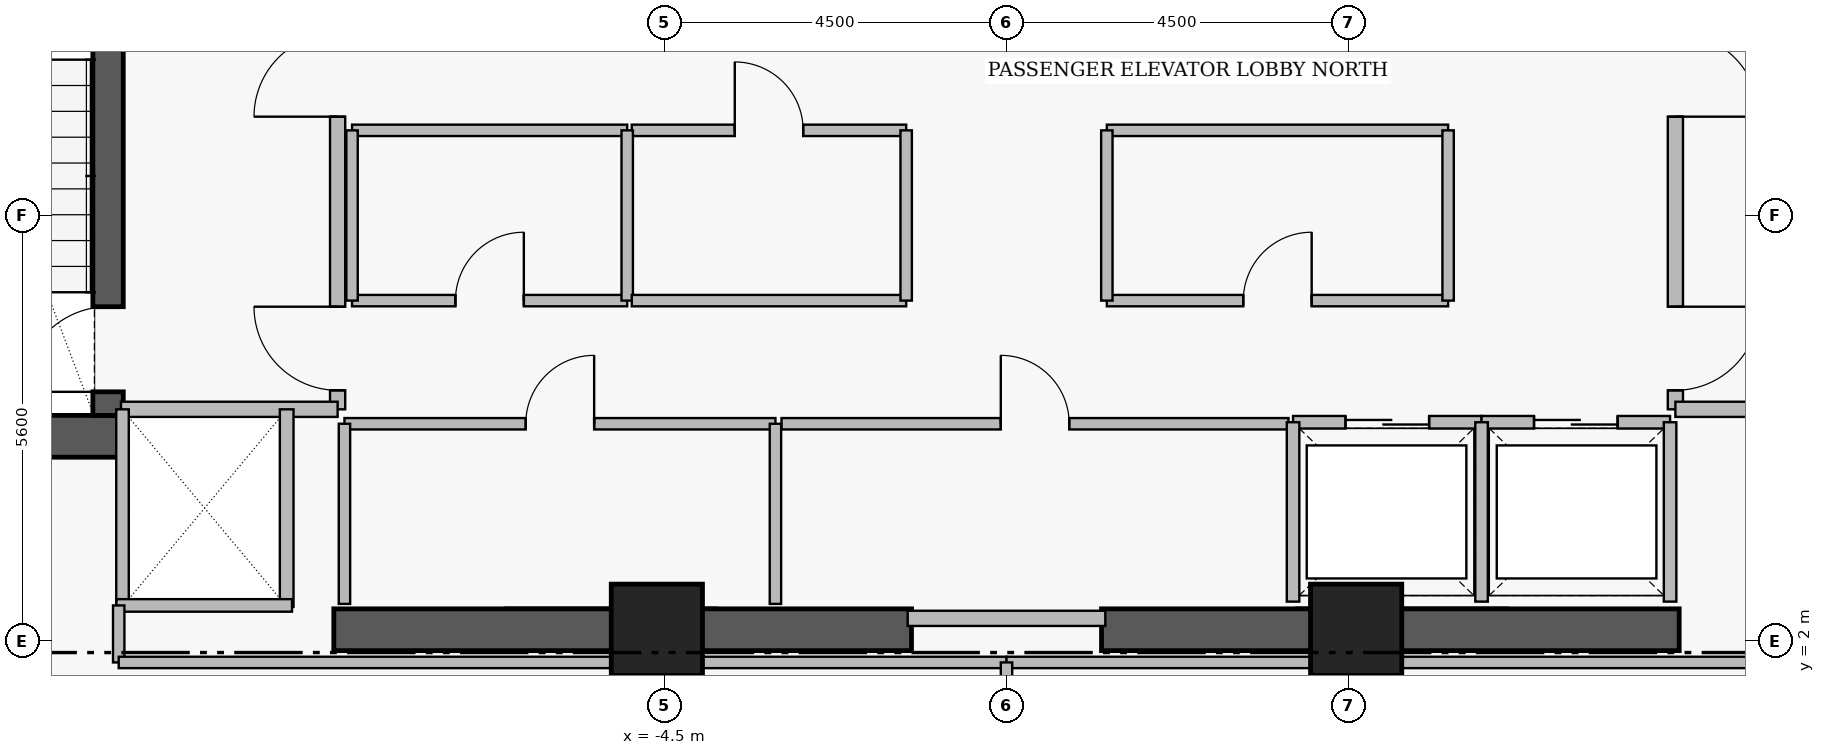
"""IFC4 building model, lengths in metres.
Left out: names, types, materials, properties, quantities, classifications, styles, units other than length and angle.
Written with IfcOpenShell. Run it as: python <this file> out.ifc"""

import sys

from ifc_helpers import new_model, si_unit, direction, frame, frame_2d, origin, origin_2d, place, context, subcontext, project, spatial, rectangle, extrude, element, fill, save


model = new_model("IFC4")
c1 = context("Model", 3, precision=1e-05, world=origin(), true_north=direction((0.0, 1.0)))
c2 = subcontext(c1, "Body", "Model", "MODEL_VIEW")
j1 = project(units=[si_unit("LENGTHUNIT", "METRE"), si_unit("PLANEANGLEUNIT", "RADIAN")], contexts=[c1])
p1 = place(None, origin())
s1 = spatial("IfcSite", under=j1, at=p1, CompositionType="ELEMENT")
p2 = place(p1, origin())
s2 = spatial("IfcBuilding", under=s1, at=p2, CompositionType="ELEMENT")
p3 = place(p2, frame((0.0, 0.0, 280.35)))
s3 = spatial("IfcBuildingStorey", under=s2, at=p3, CompositionType="ELEMENT", Elevation=280.35)
p4 = place(p3, frame((-15.96, 4.695, 0.0), z_axis=(0.0, 0.0, 1.0), x_axis=(1.0, 0.0, 0.0)))
e1 = element("IfcWall", 1, at=p4, inside=s3, PredefinedType="SHEAR", context=c2, shape_type="SweptSolid", body=[
    extrude(rectangle(XDim=4.36, YDim=0.55, at=frame_2d((2.18, 0.0))), origin(), (0.0, 0.0, 1.0), 3.51),
])
for number, where, z_axis, x_axis in (
    (2, (-8.85, 2.15, 0.0), (0.0, 0.0, 1.0), (1.0, 0.0, 0.0)),
    (3, (1.25, 2.15, 0.0), (0.0, 0.0, 1.0), (1.0, 0.0, 0.0)),
):
    element("IfcWall", number, at=place(p3, frame(where, z_axis=z_axis, x_axis=x_axis)), inside=s3, PredefinedType="SHEAR", context=c2, shape_type="SweptSolid", body=[
        extrude(rectangle(XDim=7.6, YDim=0.55, at=frame_2d((3.8, 0.0))), origin(), (0.0, 0.0, 1.0), 3.48),
    ])
p5 = place(p3, frame((-11.82, 4.97, 0.0), z_axis=(0.0, 0.0, 1.0), x_axis=(0.0, 1.0, 0.0)))
e4 = element("IfcWall", 4, at=p5, inside=s3, PredefinedType="SHEAR", context=c2, shape_type="SweptSolid", body=[
    extrude(rectangle(XDim=8.96, YDim=0.4, at=frame_2d((4.48, 0.0))), origin(), (0.0, 0.0, 1.0), 3.51),
])
p6 = place(p5, frame((0.31, 0.0, 0.0)))
e5 = element("IfcOpeningElement", 5, at=p6, cuts=e4, PredefinedType="OPENING", context=c2, shape_type="SweptSolid", body=[
    extrude(rectangle(XDim=1.12, YDim=2.22, at=frame_2d((0.56, 1.11))), frame((0.0, 0.21, 0.0), z_axis=(0.0, -1.0, 0.0), x_axis=(1.0, 0.0, 0.0)), (0.0, 0.0, 1.0), 0.42),
])
for number, where, z_axis, x_axis in (
    (6, (-4.6, 2.15, 0.0), (0.0, 0.0, 1.0), (1.0, 0.0, 0.0)),
    (7, (4.6, 2.15, 0.0), (0.0, 0.0, 1.0), (1.0, 0.0, 0.0)),
):
    element("IfcColumn", number, at=place(p3, frame(where, z_axis=z_axis, x_axis=x_axis)), inside=s3, PredefinedType="COLUMN", context=c2, shape_type="SweptSolid", body=[
        extrude(rectangle(XDim=1.2, YDim=1.2, at=origin_2d()), origin(), (0.0, 0.0, 1.0), 3.7),
    ])
p7 = place(p3, frame((-8.8, 5.05, 0.0), z_axis=(0.0, 0.0, 1.0), x_axis=(0.0, 1.0, 0.0)))
e8 = element("IfcWall", 8, at=p7, inside=s3, PredefinedType="PARTITIONING", context=c2, shape_type="SweptSolid", body=[
    extrude(rectangle(XDim=6.1, YDim=0.2, at=frame_2d((3.05, 0.0))), origin(), (0.0, 0.0, 1.0), 3.48),
])
p8 = place(p7, frame((0.25, 0.0, 0.0)))
e9 = element("IfcOpeningElement", 9, at=p8, cuts=e8, PredefinedType="OPENING", context=c2, shape_type="SweptSolid", body=[
    extrude(rectangle(XDim=1.1, YDim=2.2, at=frame_2d((0.55, 1.1))), frame((0.0, 0.11, 0.0), z_axis=(0.0, -1.0, 0.0), x_axis=(1.0, 0.0, 0.0)), (0.0, 0.0, 1.0), 0.22),
])
p9 = place(p7, frame((3.85, 0.0, 0.0)))
e10 = element("IfcOpeningElement", 10, at=p9, cuts=e8, PredefinedType="OPENING", context=c2, shape_type="SweptSolid", body=[
    extrude(rectangle(XDim=1.1, YDim=2.2, at=frame_2d((0.55, 1.1))), frame((0.0, 0.11, 0.0), z_axis=(0.0, -1.0, 0.0), x_axis=(1.0, 0.0, 0.0)), (0.0, 0.0, 1.0), 0.22),
])
p10 = place(p3, frame((8.8, 11.15, 0.0), z_axis=(0.0, 0.0, 1.0), x_axis=(0.0, -1.0, 0.0)))
e11 = element("IfcWall", 11, at=p10, inside=s3, PredefinedType="PARTITIONING", context=c2, shape_type="SweptSolid", body=[
    extrude(rectangle(XDim=6.1, YDim=0.2, at=frame_2d((3.05, 0.0))), origin(), (0.0, 0.0, 1.0), 3.48),
])
p11 = place(p10, frame((1.15, 0.0, 0.0)))
e12 = element("IfcOpeningElement", 12, at=p11, cuts=e11, PredefinedType="OPENING", context=c2, shape_type="SweptSolid", body=[
    extrude(rectangle(XDim=1.1, YDim=2.2, at=frame_2d((0.55, 1.1))), frame((0.0, 0.11, 0.0), z_axis=(0.0, -1.0, 0.0), x_axis=(1.0, 0.0, 0.0)), (0.0, 0.0, 1.0), 0.22),
])
p12 = place(p10, frame((4.75, 0.0, 0.0)))
e13 = element("IfcOpeningElement", 13, at=p12, cuts=e11, PredefinedType="OPENING", context=c2, shape_type="SweptSolid", body=[
    extrude(rectangle(XDim=1.1, YDim=2.2, at=frame_2d((0.55, 1.1))), frame((0.0, 0.11, 0.0), z_axis=(0.0, -1.0, 0.0), x_axis=(1.0, 0.0, 0.0)), (0.0, 0.0, 1.0), 0.22),
])
p13 = place(p3, frame((3.77, 4.88, 0.0), z_axis=(0.0, 0.0, 1.0), x_axis=(1.0, 0.0, 0.0)))
e14 = element("IfcWall", 14, at=p13, inside=s3, PredefinedType="PARTITIONING", context=c2, shape_type="SweptSolid", body=[
    extrude(rectangle(XDim=2.48, YDim=0.165, at=frame_2d((1.24, 0.0))), origin(), (0.0, 0.0, 1.0), 3.48),
])
p14 = place(p13, frame((0.69, 0.0, 0.0)))
e15 = element("IfcOpeningElement", 15, at=p14, cuts=e14, PredefinedType="OPENING", context=c2, shape_type="SweptSolid", body=[
    extrude(rectangle(XDim=1.1, YDim=2.25, at=frame_2d((0.55, 1.125))), frame((0.0, 0.093, 0.0), z_axis=(0.0, -1.0, 0.0), x_axis=(1.0, 0.0, 0.0)), (0.0, 0.0, 1.0), 0.185),
])
p15 = place(p3, frame((6.25, 4.88, 0.0), z_axis=(0.0, 0.0, 1.0), x_axis=(1.0, 0.0, 0.0)))
e16 = element("IfcWall", 16, at=p15, inside=s3, PredefinedType="PARTITIONING", context=c2, shape_type="SweptSolid", body=[
    extrude(rectangle(XDim=2.48, YDim=0.165, at=frame_2d((1.24, 0.0))), origin(), (0.0, 0.0, 1.0), 3.48),
])
p16 = place(p15, frame((0.69, 0.0, 0.0)))
e17 = element("IfcOpeningElement", 17, at=p16, cuts=e16, PredefinedType="OPENING", context=c2, shape_type="SweptSolid", body=[
    extrude(rectangle(XDim=1.1, YDim=2.25, at=frame_2d((0.55, 1.125))), frame((0.0, 0.093, 0.0), z_axis=(0.0, -1.0, 0.0), x_axis=(1.0, 0.0, 0.0)), (0.0, 0.0, 1.0), 0.185),
])
p17 = place(p3, frame((-8.71, 4.86, 0.0), z_axis=(0.0, 0.0, 1.0), x_axis=(1.0, 0.0, 0.0)))
e18 = element("IfcWall", 18, at=p17, inside=s3, PredefinedType="PARTITIONING", context=c2, shape_type="SweptSolid", body=[
    extrude(rectangle(XDim=5.67, YDim=0.15, at=frame_2d((2.835, 0.0))), origin(), (0.0, 0.0, 1.0), 3.48),
])
p18 = place(p17, frame((2.385, 0.0, 0.0)))
e19 = element("IfcOpeningElement", 19, at=p18, cuts=e18, PredefinedType="OPENING", context=c2, shape_type="SweptSolid", body=[
    extrude(rectangle(XDim=0.9, YDim=2.15, at=frame_2d((0.45, 1.075))), frame((0.0, 0.085, 0.0), z_axis=(0.0, -1.0, 0.0), x_axis=(1.0, 0.0, 0.0)), (0.0, 0.0, 1.0), 0.17),
])
p19 = place(p3, frame((-2.96, 4.86, 0.0), z_axis=(0.0, 0.0, 1.0), x_axis=(1.0, 0.0, 0.0)))
e20 = element("IfcWall", 20, at=p19, inside=s3, PredefinedType="PARTITIONING", context=c2, shape_type="SweptSolid", body=[
    extrude(rectangle(XDim=6.67, YDim=0.15, at=frame_2d((3.335, 0.0))), origin(), (0.0, 0.0, 1.0), 3.48),
])
p20 = place(p19, frame((2.885, 0.0, 0.0)))
e21 = element("IfcOpeningElement", 21, at=p20, cuts=e20, PredefinedType="OPENING", context=c2, shape_type="SweptSolid", body=[
    extrude(rectangle(XDim=0.9, YDim=2.15, at=frame_2d((0.45, 1.075))), frame((0.0, 0.085, 0.0), z_axis=(0.0, -1.0, 0.0), x_axis=(1.0, 0.0, 0.0)), (0.0, 0.0, 1.0), 0.17),
])
p21 = place(p3, frame((-8.61, 6.48, 0.0), z_axis=(0.0, 0.0, 1.0), x_axis=(1.0, 0.0, 0.0)))
e22 = element("IfcWall", 22, at=p21, inside=s3, PredefinedType="PARTITIONING", context=c2, shape_type="SweptSolid", body=[
    extrude(rectangle(XDim=3.62, YDim=0.15, at=frame_2d((1.81, 0.0))), origin(), (0.0, 0.0, 1.0), 3.48),
])
p22 = place(p21, frame((1.36, 0.0, 0.0)))
e23 = element("IfcOpeningElement", 23, at=p22, cuts=e22, PredefinedType="OPENING", context=c2, shape_type="SweptSolid", body=[
    extrude(rectangle(XDim=0.9, YDim=2.15, at=frame_2d((0.45, 1.075))), frame((0.0, 0.085, 0.0), z_axis=(0.0, -1.0, 0.0), x_axis=(1.0, 0.0, 0.0)), (0.0, 0.0, 1.0), 0.17),
])
p23 = place(p3, frame((-4.93, 8.72, 0.0), z_axis=(0.0, 0.0, 1.0), x_axis=(1.0, 0.0, 0.0)))
e24 = element("IfcWall", 24, at=p23, inside=s3, PredefinedType="PARTITIONING", context=c2, shape_type="SweptSolid", body=[
    extrude(rectangle(XDim=3.61, YDim=0.15, at=frame_2d((1.805, 0.0))), origin(), (0.0, 0.0, 1.0), 3.48),
])
p24 = place(p23, frame((1.355, 0.0, 0.0)))
e25 = element("IfcOpeningElement", 25, at=p24, cuts=e24, PredefinedType="OPENING", context=c2, shape_type="SweptSolid", body=[
    extrude(rectangle(XDim=0.9, YDim=2.15, at=frame_2d((0.45, 1.075))), frame((0.0, 0.085, 0.0), z_axis=(0.0, -1.0, 0.0), x_axis=(1.0, 0.0, 0.0)), (0.0, 0.0, 1.0), 0.17),
])
p25 = place(p3, frame((1.32, 6.48, 0.0), z_axis=(0.0, 0.0, 1.0), x_axis=(1.0, 0.0, 0.0)))
e26 = element("IfcWall", 26, at=p25, inside=s3, PredefinedType="PARTITIONING", context=c2, shape_type="SweptSolid", body=[
    extrude(rectangle(XDim=4.49, YDim=0.15, at=frame_2d((2.245, 0.0))), origin(), (0.0, 0.0, 1.0), 3.48),
])
p26 = place(p25, frame((1.795, 0.0, 0.0)))
e27 = element("IfcOpeningElement", 27, at=p26, cuts=e26, PredefinedType="OPENING", context=c2, shape_type="SweptSolid", body=[
    extrude(rectangle(XDim=0.9, YDim=2.15, at=frame_2d((0.45, 1.075))), frame((0.0, 0.085, 0.0), z_axis=(0.0, -1.0, 0.0), x_axis=(1.0, 0.0, 0.0)), (0.0, 0.0, 1.0), 0.17),
])
for number, where, z_axis, x_axis in (
    (28, (-11.65, 5.05, 0.0), (0.0, 0.0, 1.0), (1.0, 0.0, 0.0)),
    (29, (8.8, 5.05, 0.0), (0.0, 0.0, 1.0), (1.0, 0.0, 0.0)),
):
    element("IfcWall", number, at=place(p3, frame(where, z_axis=z_axis, x_axis=x_axis)), inside=s3, PredefinedType="PARTITIONING", context=c2, shape_type="SweptSolid", body=[
        extrude(rectangle(XDim=2.85, YDim=0.2, at=frame_2d((1.425, 0.0))), origin(), (0.0, 0.0, 1.0), 3.48),
    ])
for number, where, z_axis, x_axis in (
    (30, (3.77, 2.52, 0.0), (0.0, 0.0, 1.0), (0.0, 1.0, 0.0)),
    (31, (6.25, 2.52, 0.0), (0.0, 0.0, 1.0), (0.0, 1.0, 0.0)),
    (32, (8.73, 2.52, 0.0), (0.0, 0.0, 1.0), (0.0, 1.0, 0.0)),
):
    element("IfcWall", number, at=place(p3, frame(where, z_axis=z_axis, x_axis=x_axis)), inside=s3, PredefinedType="PARTITIONING", context=c2, shape_type="SweptSolid", body=[
        extrude(rectangle(XDim=2.36, YDim=0.165, at=frame_2d((1.18, 0.0))), origin(), (0.0, 0.0, 1.0), 3.48),
    ])
p27 = place(p3, frame((-1.3, 2.3, 0.0), z_axis=(0.0, 0.0, 1.0), x_axis=(1.0, 0.0, 0.0)))
e33 = element("IfcWall", 33, at=p27, inside=s3, PredefinedType="PARTITIONING", context=c2, shape_type="SweptSolid", body=[
    extrude(rectangle(XDim=2.6, YDim=0.2, at=frame_2d((1.3, 0.0))), origin(), (0.0, 0.0, 1.0), 2.38),
])
for number, where, z_axis, x_axis in (
    (34, (-8.71, 2.49, 0.0), (0.0, 0.0, 1.0), (0.0, 1.0, 0.0)),
    (35, (-3.04, 2.49, 0.0), (0.0, 0.0, 1.0), (0.0, 1.0, 0.0)),
):
    element("IfcWall", number, at=place(p3, frame(where, z_axis=z_axis, x_axis=x_axis)), inside=s3, PredefinedType="PARTITIONING", context=c2, shape_type="SweptSolid", body=[
        extrude(rectangle(XDim=2.37, YDim=0.15, at=frame_2d((1.185, 0.0))), origin(), (0.0, 0.0, 1.0), 3.48),
    ])
p28 = place(p3, frame((-9.47, 2.45, 0.0), z_axis=(0.0, 0.0, 1.0), x_axis=(0.0, 1.0, 0.0)))
e36 = element("IfcWall", 36, at=p28, inside=s3, PredefinedType="PARTITIONING", context=c2, shape_type="SweptSolid", body=[
    extrude(rectangle(XDim=2.6, YDim=0.18, at=frame_2d((1.3, 0.0))), origin(), (0.0, 0.0, 1.0), 3.48),
])
p29 = place(p3, frame((-11.63, 2.47, 0.0), z_axis=(0.0, 0.0, 1.0), x_axis=(0.0, 1.0, 0.0)))
e37 = element("IfcWall", 37, at=p29, inside=s3, PredefinedType="PARTITIONING", context=c2, shape_type="SweptSolid", body=[
    extrude(rectangle(XDim=2.58, YDim=0.165, at=frame_2d((1.29, 0.0))), origin(), (0.0, 0.0, 1.0), 3.48),
])
p30 = place(p3, frame((-11.71, 2.47, 0.0), z_axis=(0.0, 0.0, 1.0), x_axis=(1.0, 0.0, 0.0)))
e38 = element("IfcWall", 38, at=p30, inside=s3, PredefinedType="PARTITIONING", context=c2, shape_type="SweptSolid", body=[
    extrude(rectangle(XDim=2.31, YDim=0.165, at=frame_2d((1.155, 0.0))), origin(), (0.0, 0.0, 1.0), 2.38),
])
p31 = place(p3, frame((-8.61, 8.72, 0.0), z_axis=(0.0, 0.0, 1.0), x_axis=(1.0, 0.0, 0.0)))
e39 = element("IfcWall", 39, at=p31, inside=s3, PredefinedType="PARTITIONING", context=c2, shape_type="SweptSolid", body=[
    extrude(rectangle(XDim=3.62, YDim=0.15, at=frame_2d((1.81, 0.0))), origin(), (0.0, 0.0, 1.0), 3.48),
])
for number, where, z_axis, x_axis in (
    (40, (-8.61, 6.48, 0.0), (0.0, 0.0, 1.0), (0.0, 1.0, 0.0)),
    (41, (-4.99, 6.48, 0.0), (0.0, 0.0, 1.0), (0.0, 1.0, 0.0)),
):
    element("IfcWall", number, at=place(p3, frame(where, z_axis=z_axis, x_axis=x_axis)), inside=s3, PredefinedType="PARTITIONING", context=c2, shape_type="SweptSolid", body=[
        extrude(rectangle(XDim=2.24, YDim=0.15, at=frame_2d((1.12, 0.0))), origin(), (0.0, 0.0, 1.0), 3.48),
    ])
p32 = place(p3, frame((-4.93, 6.48, 0.0), z_axis=(0.0, 0.0, 1.0), x_axis=(1.0, 0.0, 0.0)))
e42 = element("IfcWall", 42, at=p32, inside=s3, PredefinedType="PARTITIONING", context=c2, shape_type="SweptSolid", body=[
    extrude(rectangle(XDim=3.61, YDim=0.15, at=frame_2d((1.805, 0.0))), origin(), (0.0, 0.0, 1.0), 3.48),
])
p33 = place(p3, frame((-1.32, 6.48, 0.0), z_axis=(0.0, 0.0, 1.0), x_axis=(0.0, 1.0, 0.0)))
e43 = element("IfcWall", 43, at=p33, inside=s3, PredefinedType="PARTITIONING", context=c2, shape_type="SweptSolid", body=[
    extrude(rectangle(XDim=2.24, YDim=0.15, at=frame_2d((1.12, 0.0))), origin(), (0.0, 0.0, 1.0), 3.48),
])
p34 = place(p3, frame((1.32, 8.72, 0.0), z_axis=(0.0, 0.0, 1.0), x_axis=(1.0, 0.0, 0.0)))
e44 = element("IfcWall", 44, at=p34, inside=s3, PredefinedType="PARTITIONING", context=c2, shape_type="SweptSolid", body=[
    extrude(rectangle(XDim=4.49, YDim=0.15, at=frame_2d((2.245, 0.0))), origin(), (0.0, 0.0, 1.0), 3.48),
])
for number, where, z_axis, x_axis in (
    (45, (1.32, 6.48, 0.0), (0.0, 0.0, 1.0), (0.0, 1.0, 0.0)),
    (46, (5.81, 6.48, 0.0), (0.0, 0.0, 1.0), (0.0, 1.0, 0.0)),
):
    element("IfcWall", number, at=place(p3, frame(where, z_axis=z_axis, x_axis=x_axis)), inside=s3, PredefinedType="PARTITIONING", context=c2, shape_type="SweptSolid", body=[
        extrude(rectangle(XDim=2.24, YDim=0.15, at=frame_2d((1.12, 0.0))), origin(), (0.0, 0.0, 1.0), 3.48),
    ])
p35 = place(p3, frame((-11.68, 1.72, 0.0), z_axis=(0.0, 0.0, 1.0), x_axis=(0.0, 1.0, 0.0)))
e47 = element("IfcWall", 47, at=p35, inside=s3, PredefinedType="PARTITIONING", context=c2, shape_type="SweptSolid", body=[
    extrude(rectangle(XDim=0.75, YDim=0.15, at=frame_2d((0.375, 0.0))), origin(), (0.0, 0.0, 1.0), 3.48),
])
for number, where, z_axis, x_axis in (
    (48, (-11.68, 1.72, 0.0), (0.0, 0.0, 1.0), (1.0, 0.0, 0.0)),
    (49, (0.0, 1.72, 0.0), (0.0, 0.0, 1.0), (1.0, 0.0, 0.0)),
):
    element("IfcWall", number, at=place(p3, frame(where, z_axis=z_axis, x_axis=x_axis)), inside=s3, PredefinedType="PARTITIONING", context=c2, shape_type="SweptSolid", body=[
        extrude(rectangle(XDim=11.68, YDim=0.15, at=frame_2d((5.84, 0.0))), origin(), (0.0, 0.0, 1.0), 2.38),
    ])
p36 = place(p3, frame((0.0, 0.06, 0.0), z_axis=(0.0, 0.0, 1.0), x_axis=(0.0, 1.0, 0.0)))
e50 = element("IfcWall", 50, at=p36, inside=s3, PredefinedType="PARTITIONING", context=c2, shape_type="SweptSolid", body=[
    extrude(rectangle(XDim=1.66, YDim=0.15, at=frame_2d((0.83, 0.0))), origin(), (0.0, 0.0, 1.0), 3.48),
])
p37 = place(p6, origin())
e51 = element("IfcDoor", 51, at=p37, inside=s3, OperationType="SINGLE_SWING_LEFT", PredefinedType="DOOR", context=c2, shape_type="SweptSolid", body=[
    extrude(rectangle(XDim=1.12, YDim=2.22, at=frame_2d((0.56, 1.11))), frame((0.0, 0.025, 0.0), z_axis=(0.0, -1.0, 0.0), x_axis=(1.0, 0.0, 0.0)), (0.0, 0.0, 1.0), 0.05),
])
fill(e5, e51)
p38 = place(p8, origin())
e52 = element("IfcDoor", 52, at=p38, inside=s3, OperationType="SINGLE_SWING_RIGHT", PredefinedType="DOOR", context=c2, shape_type="SweptSolid", body=[
    extrude(rectangle(XDim=1.1, YDim=2.2, at=frame_2d((0.55, 1.1))), frame((0.0, 0.025, 0.0), z_axis=(0.0, -1.0, 0.0), x_axis=(1.0, 0.0, 0.0)), (0.0, 0.0, 1.0), 0.05),
])
fill(e9, e52)
p39 = place(p9, origin())
e53 = element("IfcDoor", 53, at=p39, inside=s3, OperationType="SINGLE_SWING_LEFT", PredefinedType="DOOR", context=c2, shape_type="SweptSolid", body=[
    extrude(rectangle(XDim=1.1, YDim=2.2, at=frame_2d((0.55, 1.1))), frame((0.0, 0.025, 0.0), z_axis=(0.0, -1.0, 0.0), x_axis=(1.0, 0.0, 0.0)), (0.0, 0.0, 1.0), 0.05),
])
fill(e10, e53)
p40 = place(p11, origin())
e54 = element("IfcDoor", 54, at=p40, inside=s3, OperationType="SINGLE_SWING_RIGHT", PredefinedType="DOOR", context=c2, shape_type="SweptSolid", body=[
    extrude(rectangle(XDim=1.1, YDim=2.2, at=frame_2d((0.55, 1.1))), frame((0.0, 0.025, 0.0), z_axis=(0.0, -1.0, 0.0), x_axis=(1.0, 0.0, 0.0)), (0.0, 0.0, 1.0), 0.05),
])
fill(e12, e54)
p41 = place(p12, origin())
e55 = element("IfcDoor", 55, at=p41, inside=s3, OperationType="SINGLE_SWING_LEFT", PredefinedType="DOOR", context=c2, shape_type="SweptSolid", body=[
    extrude(rectangle(XDim=1.1, YDim=2.2, at=frame_2d((0.55, 1.1))), frame((0.0, 0.025, 0.0), z_axis=(0.0, -1.0, 0.0), x_axis=(1.0, 0.0, 0.0)), (0.0, 0.0, 1.0), 0.05),
])
fill(e13, e55)
p42 = place(p14, origin())
e56 = element("IfcDoor", 56, at=p42, inside=s3, OperationType="SLIDING_TO_LEFT", PredefinedType="DOOR", context=c2, shape_type="SweptSolid", body=[
    extrude(rectangle(XDim=1.1, YDim=2.25, at=frame_2d((0.55, 1.125))), frame((0.0, 0.025, 0.0), z_axis=(0.0, -1.0, 0.0), x_axis=(1.0, 0.0, 0.0)), (0.0, 0.0, 1.0), 0.05),
])
fill(e15, e56)
p43 = place(p16, origin())
e57 = element("IfcDoor", 57, at=p43, inside=s3, OperationType="SLIDING_TO_LEFT", PredefinedType="DOOR", context=c2, shape_type="SweptSolid", body=[
    extrude(rectangle(XDim=1.1, YDim=2.25, at=frame_2d((0.55, 1.125))), frame((0.0, 0.025, 0.0), z_axis=(0.0, -1.0, 0.0), x_axis=(1.0, 0.0, 0.0)), (0.0, 0.0, 1.0), 0.05),
])
fill(e17, e57)
p44 = place(p18, origin())
e58 = element("IfcDoor", 58, at=p44, inside=s3, OperationType="SINGLE_SWING_RIGHT", PredefinedType="DOOR", context=c2, shape_type="SweptSolid", body=[
    extrude(rectangle(XDim=0.9, YDim=2.15, at=frame_2d((0.45, 1.075))), frame((0.0, 0.025, 0.0), z_axis=(0.0, -1.0, 0.0), x_axis=(1.0, 0.0, 0.0)), (0.0, 0.0, 1.0), 0.05),
])
fill(e19, e58)
p45 = place(p20, origin())
e59 = element("IfcDoor", 59, at=p45, inside=s3, OperationType="SINGLE_SWING_LEFT", PredefinedType="DOOR", context=c2, shape_type="SweptSolid", body=[
    extrude(rectangle(XDim=0.9, YDim=2.15, at=frame_2d((0.45, 1.075))), frame((0.0, 0.025, 0.0), z_axis=(0.0, -1.0, 0.0), x_axis=(1.0, 0.0, 0.0)), (0.0, 0.0, 1.0), 0.05),
])
fill(e21, e59)
p46 = place(p22, origin())
e60 = element("IfcDoor", 60, at=p46, inside=s3, OperationType="SINGLE_SWING_RIGHT", PredefinedType="DOOR", context=c2, shape_type="SweptSolid", body=[
    extrude(rectangle(XDim=0.9, YDim=2.15, at=frame_2d((0.45, 1.075))), frame((0.0, 0.025, 0.0), z_axis=(0.0, -1.0, 0.0), x_axis=(1.0, 0.0, 0.0)), (0.0, 0.0, 1.0), 0.05),
])
fill(e23, e60)
p47 = place(p24, origin())
e61 = element("IfcDoor", 61, at=p47, inside=s3, OperationType="SINGLE_SWING_LEFT", PredefinedType="DOOR", context=c2, shape_type="SweptSolid", body=[
    extrude(rectangle(XDim=0.9, YDim=2.15, at=frame_2d((0.45, 1.075))), frame((0.0, 0.025, 0.0), z_axis=(0.0, -1.0, 0.0), x_axis=(1.0, 0.0, 0.0)), (0.0, 0.0, 1.0), 0.05),
])
fill(e25, e61)
p48 = place(p26, origin())
e62 = element("IfcDoor", 62, at=p48, inside=s3, OperationType="SINGLE_SWING_RIGHT", PredefinedType="DOOR", context=c2, shape_type="SweptSolid", body=[
    extrude(rectangle(XDim=0.9, YDim=2.15, at=frame_2d((0.45, 1.075))), frame((0.0, 0.025, 0.0), z_axis=(0.0, -1.0, 0.0), x_axis=(1.0, 0.0, 0.0)), (0.0, 0.0, 1.0), 0.05),
])
fill(e27, e62)
save(model, sys.argv[1])
